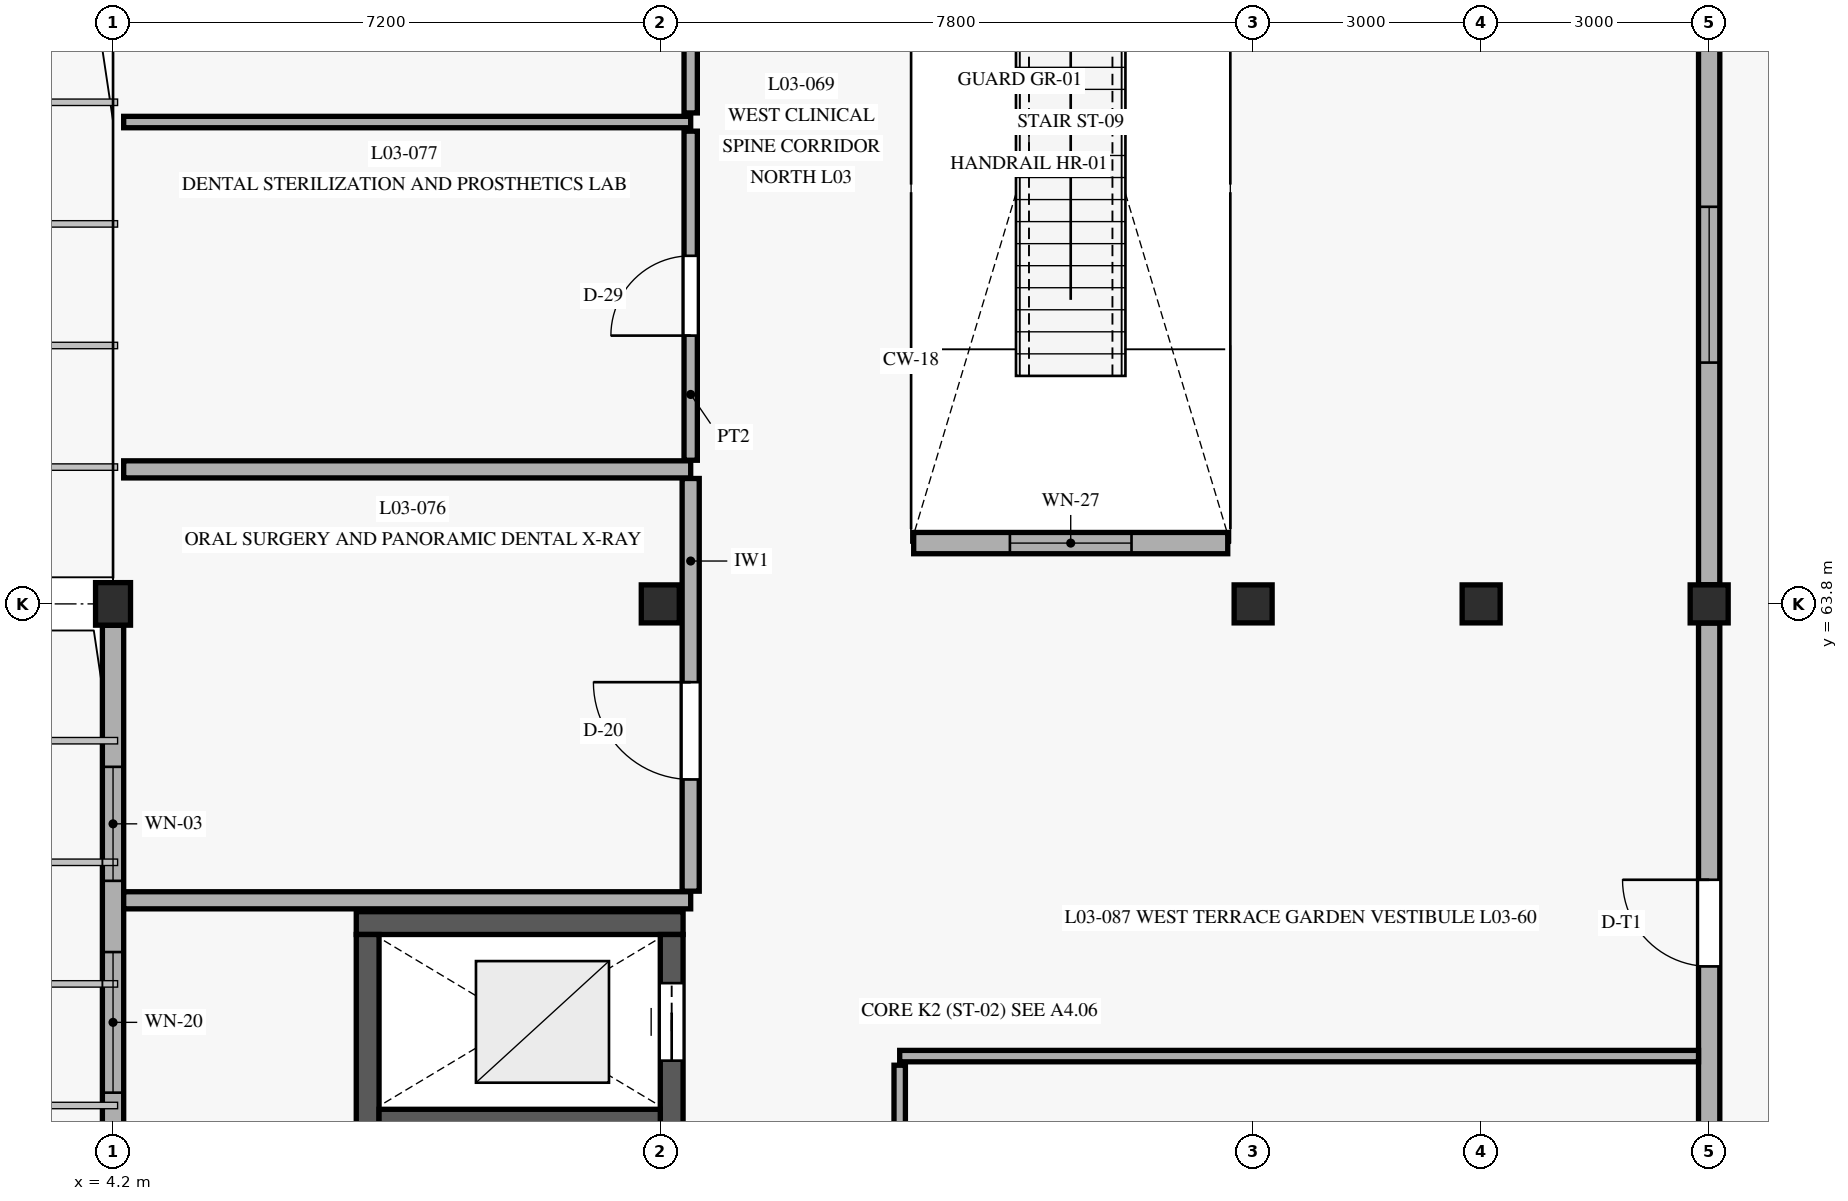
"""IFC4 building model, lengths in metres.
Left out: names, types, materials, properties, quantities, classifications, styles, units other than length and angle.
Written with IfcOpenShell. Run it as: python <this file> out.ifc"""

import sys

from ifc_helpers import new_model, si_unit, direction, frame, frame_2d, origin, origin_with_axes, origin_2d, place, context, subcontext, project, spatial, rectangle, extrude, element, fill, save


model = new_model("IFC4")
c1 = context("Model", 3, precision=1e-05, world=origin(), true_north=direction((0.0, 1.0)))
c2 = subcontext(c1, "Body", "Model", "MODEL_VIEW")
j1 = project(units=[si_unit("LENGTHUNIT", "METRE"), si_unit("PLANEANGLEUNIT", "RADIAN")], contexts=[c1])
p1 = place(None, origin())
s1 = spatial("IfcSite", under=j1, at=p1, CompositionType="ELEMENT")
p2 = place(p1, origin())
s2 = spatial("IfcBuilding", under=s1, at=p2, CompositionType="ELEMENT")
p3 = place(p2, frame((0.0, 0.0, 9.3)))
s3 = spatial("IfcBuildingStorey", under=s2, at=p3, CompositionType="ELEMENT", Elevation=9.3)
p4 = place(p3, frame((4.2, 63.8, 0.0), z_axis=(0.0, 0.0, 1.0), x_axis=(1.0, 0.0, 0.0)))
e1 = element("IfcColumn", 1, at=p4, inside=s3, PredefinedType="COLUMN", context=c2, shape_type="SweptSolid", body=[
    extrude(rectangle(XDim=0.46, YDim=0.56, at=origin_2d()), origin(), (0.0, 0.0, 1.0), 4.2),
])
for number, where, z_axis, x_axis in (
    (2, (11.4, 63.8, 0.0), (0.0, 0.0, 1.0), (1.0, 0.0, 0.0)),
    (3, (19.2, 63.8, 0.0), (0.0, 0.0, 1.0), (1.0, 0.0, 0.0)),
    (4, (22.2, 63.8, 0.0), (0.0, 0.0, 1.0), (1.0, 0.0, 0.0)),
    (5, (25.2, 63.8, 0.0), (0.0, 0.0, 1.0), (1.0, 0.0, 0.0)),
):
    element("IfcColumn", number, at=place(p3, frame(where, z_axis=z_axis, x_axis=x_axis)), inside=s3, PredefinedType="COLUMN", context=c2, shape_type="SweptSolid", body=[
        extrude(rectangle(XDim=0.5, YDim=0.5, at=origin_2d()), origin(), (0.0, 0.0, 1.0), 4.2),
    ])
p5 = place(p3, frame((11.7, 59.6, 0.0), z_axis=(0.0, 0.0, 1.0), x_axis=(-1.0, 0.0, 0.0)))
e6 = element("IfcWall", 6, at=p5, inside=s3, PredefinedType="SHEAR", context=c2, shape_type="SweptSolid", body=[
    extrude(rectangle(XDim=4.3, YDim=0.3, at=frame_2d((2.15, 0.0))), origin(), (0.0, 0.0, 1.0), 3.9),
])
p6 = place(p3, frame((7.55, 59.45, 0.0), z_axis=(0.0, 0.0, 1.0), x_axis=(0.0, -1.0, 0.0)))
e7 = element("IfcWall", 7, at=p6, inside=s3, PredefinedType="SHEAR", context=c2, shape_type="SweptSolid", body=[
    extrude(rectangle(XDim=9.5, YDim=0.3, at=frame_2d((4.75, 0.0))), origin(), (0.0, 0.0, 1.0), 3.9),
])
p7 = place(p3, frame((11.55, 49.95, 0.0), z_axis=(0.0, 0.0, 1.0), x_axis=(0.0, 1.0, 0.0)))
e8 = element("IfcWall", 8, at=p7, inside=s3, PredefinedType="SHEAR", context=c2, shape_type="SweptSolid", body=[
    extrude(rectangle(XDim=9.5, YDim=0.3, at=frame_2d((4.75, 0.0))), origin(), (0.0, 0.0, 1.0), 3.9),
])
p8 = place(p7, frame((0.2, 0.0, 0.0)))
e9 = element("IfcOpeningElement", 9, at=p8, cuts=e8, PredefinedType="OPENING", context=c2, shape_type="SweptSolid", body=[
    extrude(rectangle(XDim=1.1, YDim=2.2, at=frame_2d((0.55, 1.1))), frame((0.0, 0.16, 0.0), z_axis=(0.0, -1.0, 0.0), x_axis=(1.0, 0.0, 0.0)), (0.0, 0.0, 1.0), 0.32),
])
p9 = place(p7, frame((7.84, 0.0, 0.0)))
e10 = element("IfcOpeningElement", 10, at=p9, cuts=e8, PredefinedType="OPENING", context=c2, shape_type="SweptSolid", body=[
    extrude(rectangle(XDim=1.02, YDim=2.15, at=frame_2d((0.51, 1.075))), frame((0.0, 0.16, 0.0), z_axis=(0.0, -1.0, 0.0), x_axis=(1.0, 0.0, 0.0)), (0.0, 0.0, 1.0), 0.32),
])
p10 = place(p3, frame((7.7, 57.0, 0.0), z_axis=(0.0, 0.0, 1.0), x_axis=(1.0, 0.0, 0.0)))
e11 = element("IfcWall", 11, at=p10, inside=s3, PredefinedType="SHEAR", context=c2, shape_type="SweptSolid", body=[
    extrude(rectangle(XDim=3.7, YDim=0.3, at=frame_2d((1.85, 0.0))), origin(), (0.0, 0.0, 1.0), 3.9),
])
p11 = place(p3, frame((4.2, 63.518, 0.0), z_axis=(0.0, 0.0, 1.0), x_axis=(0.0, -1.0, 0.0)))
e12 = element("IfcWall", 12, at=p11, inside=s3, PredefinedType="SOLIDWALL", context=c2, shape_type="SweptSolid", body=[
    extrude(rectangle(XDim=7.836, YDim=0.28, at=frame_2d((3.918, 0.0))), origin(), (0.0, 0.0, 1.0), 3.48),
])
p12 = place(p11, frame((1.862, 0.0, 0.88)))
e13 = element("IfcOpeningElement", 13, at=p12, cuts=e12, PredefinedType="OPENING", context=c2, shape_type="SweptSolid", body=[
    extrude(rectangle(XDim=1.5, YDim=2.2, at=frame_2d((0.75, 1.1))), frame((0.0, 0.15, 0.0), z_axis=(0.0, -1.0, 0.0), x_axis=(1.0, 0.0, 0.0)), (0.0, 0.0, 1.0), 0.3),
])
p13 = place(p11, frame((4.299, 0.0, 0.88)))
e14 = element("IfcOpeningElement", 14, at=p13, cuts=e12, PredefinedType="OPENING", context=c2, shape_type="SweptSolid", body=[
    extrude(rectangle(XDim=1.85, YDim=1.65, at=frame_2d((0.925, 0.825))), frame((0.0, 0.15, 0.0), z_axis=(0.0, -1.0, 0.0), x_axis=(1.0, 0.0, 0.0)), (0.0, 0.0, 1.0), 0.3),
])
p14 = place(p3, frame((25.2, 55.652, 0.0), z_axis=(0.0, 0.0, 1.0), x_axis=(0.0, 1.0, 0.0)))
e15 = element("IfcWall", 15, at=p14, inside=s3, PredefinedType="SOLIDWALL", context=c2, shape_type="SweptSolid", body=[
    extrude(rectangle(XDim=7.896, YDim=0.28, at=frame_2d((3.948, 0.0))), origin(), (0.0, 0.0, 1.0), 3.49),
])
p15 = place(p14, frame((3.378, 0.0, 0.0)))
e16 = element("IfcOpeningElement", 16, at=p15, cuts=e15, PredefinedType="OPENING", context=c2, shape_type="SweptSolid", body=[
    extrude(rectangle(XDim=1.14, YDim=2.3, at=frame_2d((0.57, 1.15))), frame((0.0, 0.15, 0.0), z_axis=(0.0, -1.0, 0.0), x_axis=(1.0, 0.0, 0.0)), (0.0, 0.0, 1.0), 0.3),
])
p16 = place(p3, frame((25.2, 64.052, 0.0), z_axis=(0.0, 0.0, 1.0), x_axis=(0.0, 1.0, 0.0)))
e17 = element("IfcWall", 17, at=p16, inside=s3, PredefinedType="SOLIDWALL", context=c2, shape_type="SweptSolid", body=[
    extrude(rectangle(XDim=7.896, YDim=0.28, at=frame_2d((3.948, 0.0))), origin(), (0.0, 0.0, 1.0), 3.49),
])
p17 = place(p16, frame((2.923, 0.0, 0.8)))
e18 = element("IfcOpeningElement", 18, at=p17, cuts=e17, PredefinedType="OPENING", context=c2, shape_type="SweptSolid", body=[
    extrude(rectangle(XDim=2.05, YDim=1.95, at=frame_2d((1.025, 0.975))), frame((0.0, 0.15, 0.0), z_axis=(0.0, -1.0, 0.0), x_axis=(1.0, 0.0, 0.0)), (0.0, 0.0, 1.0), 0.3),
])
p18 = place(p3, frame((18.866, 64.6, 0.0), z_axis=(0.0, 0.0, 1.0), x_axis=(-1.0, 0.0, 0.0)))
e19 = element("IfcWall", 19, at=p18, inside=s3, PredefinedType="SOLIDWALL", context=c2, shape_type="SweptSolid", body=[
    extrude(rectangle(XDim=4.132, YDim=0.28, at=frame_2d((2.066, 0.0))), origin(), (0.0, 0.0, 1.0), 3.9),
])
p19 = place(p18, frame((1.266, 0.0, 0.85)))
e20 = element("IfcOpeningElement", 20, at=p19, cuts=e19, PredefinedType="OPENING", context=c2, shape_type="SweptSolid", body=[
    extrude(rectangle(XDim=1.6, YDim=1.8, at=frame_2d((0.8, 0.9))), frame((0.0, 0.15, 0.0), z_axis=(0.0, -1.0, 0.0), x_axis=(1.0, 0.0, 0.0)), (0.0, 0.0, 1.0), 0.3),
])
p20 = place(p3, frame((11.8, 60.02, 0.0), z_axis=(0.0, 0.0, 1.0), x_axis=(0.0, 1.0, 0.0)))
e21 = element("IfcWall", 21, at=p20, inside=s3, PredefinedType="SOLIDWALL", context=c2, shape_type="SweptSolid", body=[
    extrude(rectangle(XDim=5.43, YDim=0.225, at=frame_2d((2.715, 0.0))), origin(), (0.0, 0.0, 1.0), 3.495),
])
p21 = place(p20, frame((1.47, 0.0, 0.0)))
e22 = element("IfcOpeningElement", 22, at=p21, cuts=e21, PredefinedType="OPENING", context=c2, shape_type="SweptSolid", body=[
    extrude(rectangle(XDim=1.28, YDim=2.25, at=frame_2d((0.64, 1.125))), frame((0.0, 0.123, 0.0), z_axis=(0.0, -1.0, 0.0), x_axis=(1.0, 0.0, 0.0)), (0.0, 0.0, 1.0), 0.245),
])
for number, where, z_axis, x_axis in (
    (23, (4.34, 65.57, 0.0), (0.0, 0.0, 1.0), (1.0, 0.0, 0.0)),
    (24, (4.34, 59.9, 0.0), (0.0, 0.0, 1.0), (1.0, 0.0, 0.0)),
):
    element("IfcWall", number, at=place(p3, frame(where, z_axis=z_axis, x_axis=x_axis)), inside=s3, PredefinedType="SOLIDWALL", context=c2, shape_type="SweptSolid", body=[
        extrude(rectangle(XDim=7.46, YDim=0.225, at=frame_2d((3.73, 0.0))), origin(), (0.0, 0.0, 1.0), 3.475),
    ])
p22 = place(p3, frame((11.8, 65.69, 0.0), z_axis=(0.0, 0.0, 1.0), x_axis=(0.0, 1.0, 0.0)))
e25 = element("IfcWall", 25, at=p22, inside=s3, PredefinedType="PARTITIONING", context=c2, shape_type="SweptSolid", body=[
    extrude(rectangle(XDim=4.33, YDim=0.175, at=frame_2d((2.165, 0.0))), origin(), (0.0, 0.0, 1.0), 3.895),
])
p23 = place(p22, frame((1.64, 0.0, 0.0)))
e26 = element("IfcOpeningElement", 26, at=p23, cuts=e25, PredefinedType="OPENING", context=c2, shape_type="SweptSolid", body=[
    extrude(rectangle(XDim=1.05, YDim=2.24, at=frame_2d((0.525, 1.12))), frame((0.0, 0.098, 0.0), z_axis=(0.0, -1.0, 0.0), x_axis=(1.0, 0.0, 0.0)), (0.0, 0.0, 1.0), 0.195),
])
p24 = place(p3, frame((4.34, 70.14, 0.0), z_axis=(0.0, 0.0, 1.0), x_axis=(1.0, 0.0, 0.0)))
e27 = element("IfcWall", 27, at=p24, inside=s3, PredefinedType="PARTITIONING", context=c2, shape_type="SweptSolid", body=[
    extrude(rectangle(XDim=7.46, YDim=0.15, at=frame_2d((3.73, 0.0))), origin(), (0.0, 0.0, 1.0), 3.475),
])
p25 = place(p3, frame((11.8, 70.26, 0.0), z_axis=(0.0, 0.0, 1.0), x_axis=(0.0, 1.0, 0.0)))
e28 = element("IfcWall", 28, at=p25, inside=s3, PredefinedType="PARTITIONING", context=c2, shape_type="SweptSolid", body=[
    extrude(rectangle(XDim=5.65, YDim=0.175, at=frame_2d((2.825, 0.0))), origin(), (0.0, 0.0, 1.0), 3.895),
])
p26 = place(p25, frame((2.967, 0.0, 0.0)))
e29 = element("IfcOpeningElement", 29, at=p26, cuts=e28, PredefinedType="OPENING", context=c2, shape_type="SweptSolid", body=[
    extrude(rectangle(XDim=1.22, YDim=2.2, at=frame_2d((0.61, 1.1))), frame((0.0, 0.098, 0.0), z_axis=(0.0, -1.0, 0.0), x_axis=(1.0, 0.0, 0.0)), (0.0, 0.0, 1.0), 0.195),
])
p27 = place(p3, frame((14.55, 49.4, 0.0), z_axis=(0.0, 0.0, 1.0), x_axis=(0.0, 1.0, 0.0)))
e30 = element("IfcWall", 30, at=p27, inside=s3, PredefinedType="PARTITIONING", context=c2, shape_type="SweptSolid", body=[
    extrude(rectangle(XDim=8.33, YDim=0.15, at=frame_2d((4.165, 0.0))), origin(), (0.0, 0.0, 1.0), 3.495),
])
p28 = place(p27, frame((3.751, 0.0, 0.0)))
e31 = element("IfcOpeningElement", 31, at=p28, cuts=e30, PredefinedType="OPENING", context=c2, shape_type="SweptSolid", body=[
    extrude(rectangle(XDim=0.98, YDim=2.12, at=frame_2d((0.49, 1.06))), frame((0.0, 0.085, 0.0), z_axis=(0.0, -1.0, 0.0), x_axis=(1.0, 0.0, 0.0)), (0.0, 0.0, 1.0), 0.17),
])
p29 = place(p3, frame((14.55, 57.85, 0.0), z_axis=(0.0, 0.0, 1.0), x_axis=(1.0, 0.0, 0.0)))
e32 = element("IfcWall", 32, at=p29, inside=s3, PredefinedType="PARTITIONING", context=c2, shape_type="SweptSolid", body=[
    extrude(rectangle(XDim=10.51, YDim=0.15, at=frame_2d((5.255, 0.0))), origin(), (0.0, 0.0, 1.0), 3.485),
])
p30 = place(p9, origin_with_axes())
e33 = element("IfcDoor", 33, at=p30, inside=s3, OperationType="SLIDING_TO_LEFT", PredefinedType="DOOR", context=c2, shape_type="SweptSolid", body=[
    extrude(rectangle(XDim=1.02, YDim=2.15, at=frame_2d((0.51, 1.075))), frame((0.0, 0.025, 0.0), z_axis=(0.0, -1.0, 0.0), x_axis=(1.0, 0.0, 0.0)), (0.0, 0.0, 1.0), 0.05),
])
fill(e10, e33)
p31 = place(p12, origin_with_axes())
e34 = element("IfcWindow", 34, at=p31, inside=s3, PartitioningType="SINGLE_PANEL", PredefinedType="WINDOW", context=c2, shape_type="SweptSolid", body=[
    extrude(rectangle(XDim=1.5, YDim=2.2, at=frame_2d((0.75, 1.1))), frame((0.0, 0.03, 0.0), z_axis=(0.0, -1.0, 0.0), x_axis=(1.0, 0.0, 0.0)), (0.0, 0.0, 1.0), 0.06),
])
fill(e13, e34)
p32 = place(p13, origin_with_axes())
e35 = element("IfcWindow", 35, at=p32, inside=s3, PartitioningType="SINGLE_PANEL", PredefinedType="WINDOW", context=c2, shape_type="SweptSolid", body=[
    extrude(rectangle(XDim=1.85, YDim=1.65, at=frame_2d((0.925, 0.825))), frame((0.0, 0.03, 0.0), z_axis=(0.0, -1.0, 0.0), x_axis=(1.0, 0.0, 0.0)), (0.0, 0.0, 1.0), 0.06),
])
fill(e14, e35)
p33 = place(p15, frame((1.14, 0.0, 0.0), z_axis=(0.0, 0.0, 1.0), x_axis=(-1.0, 0.0, 0.0)))
e36 = element("IfcDoor", 36, at=p33, inside=s3, OperationType="SINGLE_SWING_LEFT", PredefinedType="DOOR", context=c2, shape_type="SweptSolid", body=[
    extrude(rectangle(XDim=1.14, YDim=2.3, at=frame_2d((0.57, 1.15))), frame((0.0, 0.025, 0.0), z_axis=(0.0, -1.0, 0.0), x_axis=(1.0, 0.0, 0.0)), (0.0, 0.0, 1.0), 0.05),
])
fill(e16, e36)
p34 = place(p17, origin_with_axes())
e37 = element("IfcWindow", 37, at=p34, inside=s3, PartitioningType="SINGLE_PANEL", PredefinedType="WINDOW", context=c2, shape_type="SweptSolid", body=[
    extrude(rectangle(XDim=2.05, YDim=1.95, at=frame_2d((1.025, 0.975))), frame((0.0, 0.03, 0.0), z_axis=(0.0, -1.0, 0.0), x_axis=(1.0, 0.0, 0.0)), (0.0, 0.0, 1.0), 0.06),
])
fill(e18, e37)
p35 = place(p19, origin_with_axes())
e38 = element("IfcWindow", 38, at=p35, inside=s3, PartitioningType="SINGLE_PANEL", PredefinedType="WINDOW", context=c2, shape_type="SweptSolid", body=[
    extrude(rectangle(XDim=1.6, YDim=1.8, at=frame_2d((0.8, 0.9))), frame((0.0, 0.03, 0.0), z_axis=(0.0, -1.0, 0.0), x_axis=(1.0, 0.0, 0.0)), (0.0, 0.0, 1.0), 0.06),
])
fill(e20, e38)
p36 = place(p21, origin_with_axes())
e39 = element("IfcDoor", 39, at=p36, inside=s3, OperationType="SINGLE_SWING_RIGHT", PredefinedType="DOOR", context=c2, shape_type="SweptSolid", body=[
    extrude(rectangle(XDim=1.28, YDim=2.25, at=frame_2d((0.64, 1.125))), frame((0.0, 0.025, 0.0), z_axis=(0.0, -1.0, 0.0), x_axis=(1.0, 0.0, 0.0)), (0.0, 0.0, 1.0), 0.05),
])
fill(e22, e39)
p37 = place(p23, origin_with_axes())
e40 = element("IfcDoor", 40, at=p37, inside=s3, OperationType="SINGLE_SWING_LEFT", PredefinedType="DOOR", context=c2, shape_type="SweptSolid", body=[
    extrude(rectangle(XDim=1.05, YDim=2.24, at=frame_2d((0.525, 1.12))), frame((0.0, 0.025, 0.0), z_axis=(0.0, -1.0, 0.0), x_axis=(1.0, 0.0, 0.0)), (0.0, 0.0, 1.0), 0.05),
])
fill(e26, e40)
save(model, sys.argv[1])
